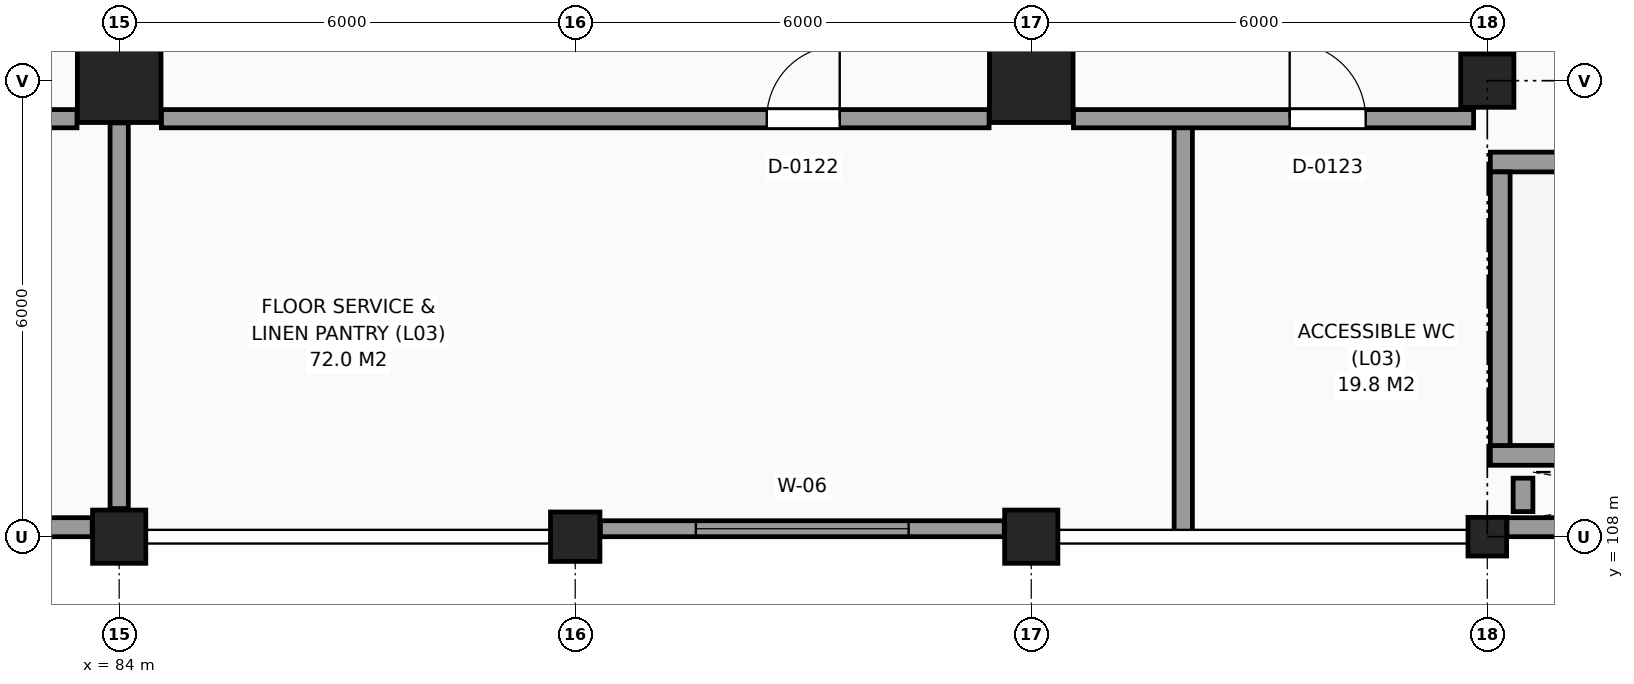
"""IFC4 building model, lengths in metres.
Left out: names, types, materials, properties, quantities, classifications, styles, units other than length and angle.
Written with IfcOpenShell. Run it as: python <this file> out.ifc"""

import sys

from ifc_helpers import new_model, si_unit, direction, frame, frame_2d, origin, origin_2d, place, context, subcontext, project, spatial, rectangle, circle, hollow_circle, extrude, element, fill, save


model = new_model("IFC4")
c1 = context("Model", 3, precision=1e-05, world=origin(), true_north=direction((0.0, 1.0)))
c2 = subcontext(c1, "Body", "Model", "MODEL_VIEW")
j1 = project(units=[si_unit("LENGTHUNIT", "METRE"), si_unit("PLANEANGLEUNIT", "RADIAN")], contexts=[c1])
p1 = place(None, origin())
s1 = spatial("IfcSite", under=j1, at=p1, CompositionType="ELEMENT")
p2 = place(p1, origin())
s2 = spatial("IfcBuilding", under=s1, at=p2, CompositionType="ELEMENT")
p3 = place(p2, frame((0.0, 0.0, 15.0)))
s3 = spatial("IfcBuildingStorey", under=s2, at=p3, CompositionType="ELEMENT", Elevation=15.0)
p4 = place(p3, frame((84.0, 108.0, 0.0), z_axis=(0.0, 0.0, 1.0), x_axis=(1.0, 0.0, 0.0)))
e1 = element("IfcColumn", 1, at=p4, inside=s3, PredefinedType="COLUMN", context=c2, shape_type="SweptSolid", body=[
    extrude(rectangle(XDim=0.7, YDim=0.7, at=origin_2d()), origin(), (0.0, 0.0, 1.0), 4.8),
])
p5 = place(p3, frame((84.0, 114.0, 0.0), z_axis=(0.0, 0.0, 1.0), x_axis=(1.0, 0.0, 0.0)))
e2 = element("IfcColumn", 2, at=p5, inside=s3, PredefinedType="COLUMN", context=c2, shape_type="SweptSolid", body=[
    extrude(rectangle(XDim=1.1, YDim=1.1, at=origin_2d()), origin(), (0.0, 0.0, 1.0), 4.8),
])
p6 = place(p3, frame((90.0, 108.0, 0.0), z_axis=(0.0, 0.0, 1.0), x_axis=(1.0, 0.0, 0.0)))
e3 = element("IfcColumn", 3, at=p6, inside=s3, PredefinedType="COLUMN", context=c2, shape_type="SweptSolid", body=[
    extrude(rectangle(XDim=0.65, YDim=0.65, at=origin_2d()), origin(), (0.0, 0.0, 1.0), 4.8),
])
p7 = place(p3, frame((96.0, 108.0, 0.0), z_axis=(0.0, 0.0, 1.0), x_axis=(1.0, 0.0, 0.0)))
e4 = element("IfcColumn", 4, at=p7, inside=s3, PredefinedType="COLUMN", context=c2, shape_type="SweptSolid", body=[
    extrude(circle(Radius=0.35, at=origin_2d()), origin(), (0.0, 0.0, 1.0), 4.8),
])
p8 = place(p3, frame((96.0, 114.0, 0.0), z_axis=(0.0, 0.0, 1.0), x_axis=(1.0, 0.0, 0.0)))
e5 = element("IfcColumn", 5, at=p8, inside=s3, PredefinedType="COLUMN", context=c2, shape_type="SweptSolid", body=[
    extrude(rectangle(XDim=1.1, YDim=1.1, at=origin_2d()), origin(), (0.0, 0.0, 1.0), 4.8),
])
p9 = place(p3, frame((102.0, 108.0, 0.0), z_axis=(0.0, 0.0, 1.0), x_axis=(1.0, 0.0, 0.0)))
e6 = element("IfcColumn", 6, at=p9, inside=s3, PredefinedType="COLUMN", context=c2, shape_type="SweptSolid", body=[
    extrude(hollow_circle(Radius=0.254, WallThickness=0.025, at=origin_2d()), origin(), (0.0, 0.0, 1.0), 4.8),
])
p10 = place(p3, frame((102.0, 114.0, 0.0), z_axis=(0.0, 0.0, 1.0), x_axis=(1.0, 0.0, 0.0)))
e7 = element("IfcColumn", 7, at=p10, inside=s3, PredefinedType="COLUMN", context=c2, shape_type="SweptSolid", body=[
    extrude(rectangle(XDim=0.7, YDim=0.7, at=origin_2d()), origin(), (0.0, 0.0, 1.0), 4.8),
])
p11 = place(p3, frame((78.259, 108.125, 0.0), z_axis=(0.0, 0.0, 1.0), x_axis=(1.0, 0.0, 0.0)))
e8 = element("IfcWall", 8, at=p11, inside=s3, PredefinedType="SOLIDWALL", context=c2, shape_type="SweptSolid", body=[
    extrude(rectangle(XDim=5.386, YDim=0.25, at=frame_2d((2.693, 0.0))), origin(), (0.0, 0.0, 1.0), 3.7),
])
p12 = place(p3, frame((90.33, 108.105, 0.0), z_axis=(0.0, 0.0, 1.0), x_axis=(1.0, 0.0, 0.0)))
e9 = element("IfcWall", 9, at=p12, inside=s3, PredefinedType="SOLIDWALL", context=c2, shape_type="SweptSolid", body=[
    extrude(rectangle(XDim=5.315, YDim=0.21, at=frame_2d((2.657, 0.0))), origin(), (0.0, 0.0, 1.0), 3.7),
])
p13 = place(p12, frame((1.257, 0.0, 0.85)))
e10 = element("IfcOpeningElement", 10, at=p13, cuts=e9, PredefinedType="OPENING", context=c2, shape_type="SweptSolid", body=[
    extrude(rectangle(XDim=2.8, YDim=1.9, at=frame_2d((1.4, 0.95))), frame((0.0, 0.115, 0.0), z_axis=(0.0, -1.0, 0.0), x_axis=(1.0, 0.0, 0.0)), (0.0, 0.0, 1.0), 0.23),
])
p14 = place(p3, frame((102.259, 108.125, 0.0), z_axis=(0.0, 0.0, 1.0), x_axis=(1.0, 0.0, 0.0)))
e11 = element("IfcWall", 11, at=p14, inside=s3, PredefinedType="SOLIDWALL", context=c2, shape_type="SweptSolid", body=[
    extrude(rectangle(XDim=5.386, YDim=0.25, at=frame_2d((2.693, 0.0))), origin(), (0.0, 0.0, 1.0), 4.45),
])
for number, where, z_axis, x_axis in (
    (12, (102.04, 109.07, 0.0), (0.0, 0.0, 1.0), (1.0, 0.0, 0.0)),
    (13, (102.04, 112.93, 0.0), (0.0, 0.0, 1.0), (1.0, 0.0, 0.0)),
):
    element("IfcWall", number, at=place(p3, frame(where, z_axis=z_axis, x_axis=x_axis)), inside=s3, PredefinedType="SHEAR", context=c2, shape_type="SweptSolid", body=[
        extrude(rectangle(XDim=10.72, YDim=0.26, at=frame_2d((5.36, 0.0))), origin(), (0.0, 0.0, 1.0), 4.8),
    ])
p15 = place(p3, frame((102.17, 109.2, 0.0), z_axis=(0.0, 0.0, 1.0), x_axis=(0.0, 1.0, 0.0)))
e14 = element("IfcWall", 14, at=p15, inside=s3, PredefinedType="SHEAR", context=c2, shape_type="SweptSolid", body=[
    extrude(rectangle(XDim=3.6, YDim=0.26, at=frame_2d((1.8, 0.0))), origin(), (0.0, 0.0, 1.0), 4.8),
])
p16 = place(p3, frame((102.47, 108.33, 0.0), z_axis=(0.0, 0.0, 1.0), x_axis=(0.0, 1.0, 0.0)))
e15 = element("IfcWall", 15, at=p16, inside=s3, PredefinedType="SHEAR", context=c2, shape_type="SweptSolid", body=[
    extrude(rectangle(XDim=0.44, YDim=0.26, at=frame_2d((0.22, 0.0))), origin(), (0.0, 0.0, 1.0), 4.8),
])
p17 = place(p3, frame((84.0, 108.37, 0.0), z_axis=(0.0, 0.0, 1.0), x_axis=(0.0, 1.0, 0.0)))
e16 = element("IfcWall", 16, at=p17, inside=s3, PredefinedType="PARTITIONING", context=c2, shape_type="SweptSolid", body=[
    extrude(rectangle(XDim=5.075, YDim=0.24, at=frame_2d((2.538, 0.0))), origin(), (0.0, 0.0, 1.0), 3.65),
])
p18 = place(p3, frame((98.0, 108.045, 0.0), z_axis=(0.0, 0.0, 1.0), x_axis=(0.0, 1.0, 0.0)))
e17 = element("IfcWall", 17, at=p18, inside=s3, PredefinedType="PARTITIONING", context=c2, shape_type="SweptSolid", body=[
    extrude(rectangle(XDim=5.455, YDim=0.24, at=frame_2d((2.728, 0.0))), origin(), (0.0, 0.0, 1.0), 4.45),
])
p19 = place(p3, frame((76.75, 113.5, 0.0), z_axis=(0.0, 0.0, 1.0), x_axis=(1.0, 0.0, 0.0)))
e18 = element("IfcWall", 18, at=p19, inside=s3, PredefinedType="PARTITIONING", context=c2, shape_type="SweptSolid", body=[
    extrude(rectangle(XDim=6.695, YDim=0.24, at=frame_2d((3.348, 0.0))), origin(), (0.0, 0.0, 1.0), 2.4),
])
p20 = place(p19, frame((3.25, 0.0, 0.0)))
e19 = element("IfcOpeningElement", 19, at=p20, cuts=e18, PredefinedType="OPENING", context=c2, shape_type="SweptSolid", body=[
    extrude(rectangle(XDim=1.1, YDim=2.15, at=frame_2d((0.55, 1.075))), frame((0.0, 0.13, 0.0), z_axis=(0.0, -1.0, 0.0), x_axis=(1.0, 0.0, 0.0)), (0.0, 0.0, 1.0), 0.26),
])
p21 = place(p3, frame((84.555, 113.5, 0.0), z_axis=(0.0, 0.0, 1.0), x_axis=(1.0, 0.0, 0.0)))
e20 = element("IfcWall", 20, at=p21, inside=s3, PredefinedType="PARTITIONING", context=c2, shape_type="SweptSolid", body=[
    extrude(rectangle(XDim=10.89, YDim=0.24, at=frame_2d((5.445, 0.0))), origin(), (0.0, 0.0, 1.0), 2.4),
])
p22 = place(p21, frame((7.965, 0.0, 0.0)))
e21 = element("IfcOpeningElement", 21, at=p22, cuts=e20, PredefinedType="OPENING", context=c2, shape_type="SweptSolid", body=[
    extrude(rectangle(XDim=0.96, YDim=2.15, at=frame_2d((0.48, 1.075))), frame((0.0, 0.13, 0.0), z_axis=(0.0, -1.0, 0.0), x_axis=(1.0, 0.0, 0.0)), (0.0, 0.0, 1.0), 0.26),
])
p23 = place(p3, frame((96.555, 113.5, 0.0), z_axis=(0.0, 0.0, 1.0), x_axis=(1.0, 0.0, 0.0)))
e22 = element("IfcWall", 22, at=p23, inside=s3, PredefinedType="PARTITIONING", context=c2, shape_type="SweptSolid", body=[
    extrude(rectangle(XDim=5.265, YDim=0.24, at=frame_2d((2.633, 0.0))), origin(), (0.0, 0.0, 1.0), 4.45),
])
p24 = place(p23, frame((2.845, 0.0, 0.0)))
e23 = element("IfcOpeningElement", 23, at=p24, cuts=e22, PredefinedType="OPENING", context=c2, shape_type="SweptSolid", body=[
    extrude(rectangle(XDim=1.0, YDim=2.15, at=frame_2d((0.5, 1.075))), frame((0.0, 0.13, 0.0), z_axis=(0.0, -1.0, 0.0), x_axis=(1.0, 0.0, 0.0)), (0.0, 0.0, 1.0), 0.26),
])
p25 = place(p13, origin())
e24 = element("IfcWindow", 24, at=p25, inside=s3, PartitioningType="SINGLE_PANEL", PredefinedType="WINDOW", context=c2, shape_type="SweptSolid", body=[
    extrude(rectangle(XDim=2.8, YDim=1.9, at=frame_2d((1.4, 0.95))), frame((0.0, 0.03, 0.0), z_axis=(0.0, -1.0, 0.0), x_axis=(1.0, 0.0, 0.0)), (0.0, 0.0, 1.0), 0.06),
])
fill(e10, e24)
p26 = place(p22, origin())
e25 = element("IfcDoor", 25, at=p26, inside=s3, OperationType="SINGLE_SWING_RIGHT", PredefinedType="DOOR", context=c2, shape_type="SweptSolid", body=[
    extrude(rectangle(XDim=0.96, YDim=2.15, at=frame_2d((0.48, 1.075))), frame((0.0, 0.025, 0.0), z_axis=(0.0, -1.0, 0.0), x_axis=(1.0, 0.0, 0.0)), (0.0, 0.0, 1.0), 0.05),
])
fill(e21, e25)
p27 = place(p24, origin())
e26 = element("IfcDoor", 26, at=p27, inside=s3, OperationType="SINGLE_SWING_LEFT", PredefinedType="DOOR", context=c2, shape_type="SweptSolid", body=[
    extrude(rectangle(XDim=1.0, YDim=2.15, at=frame_2d((0.5, 1.075))), frame((0.0, 0.025, 0.0), z_axis=(0.0, -1.0, 0.0), x_axis=(1.0, 0.0, 0.0)), (0.0, 0.0, 1.0), 0.05),
])
fill(e23, e26)
save(model, sys.argv[1])
